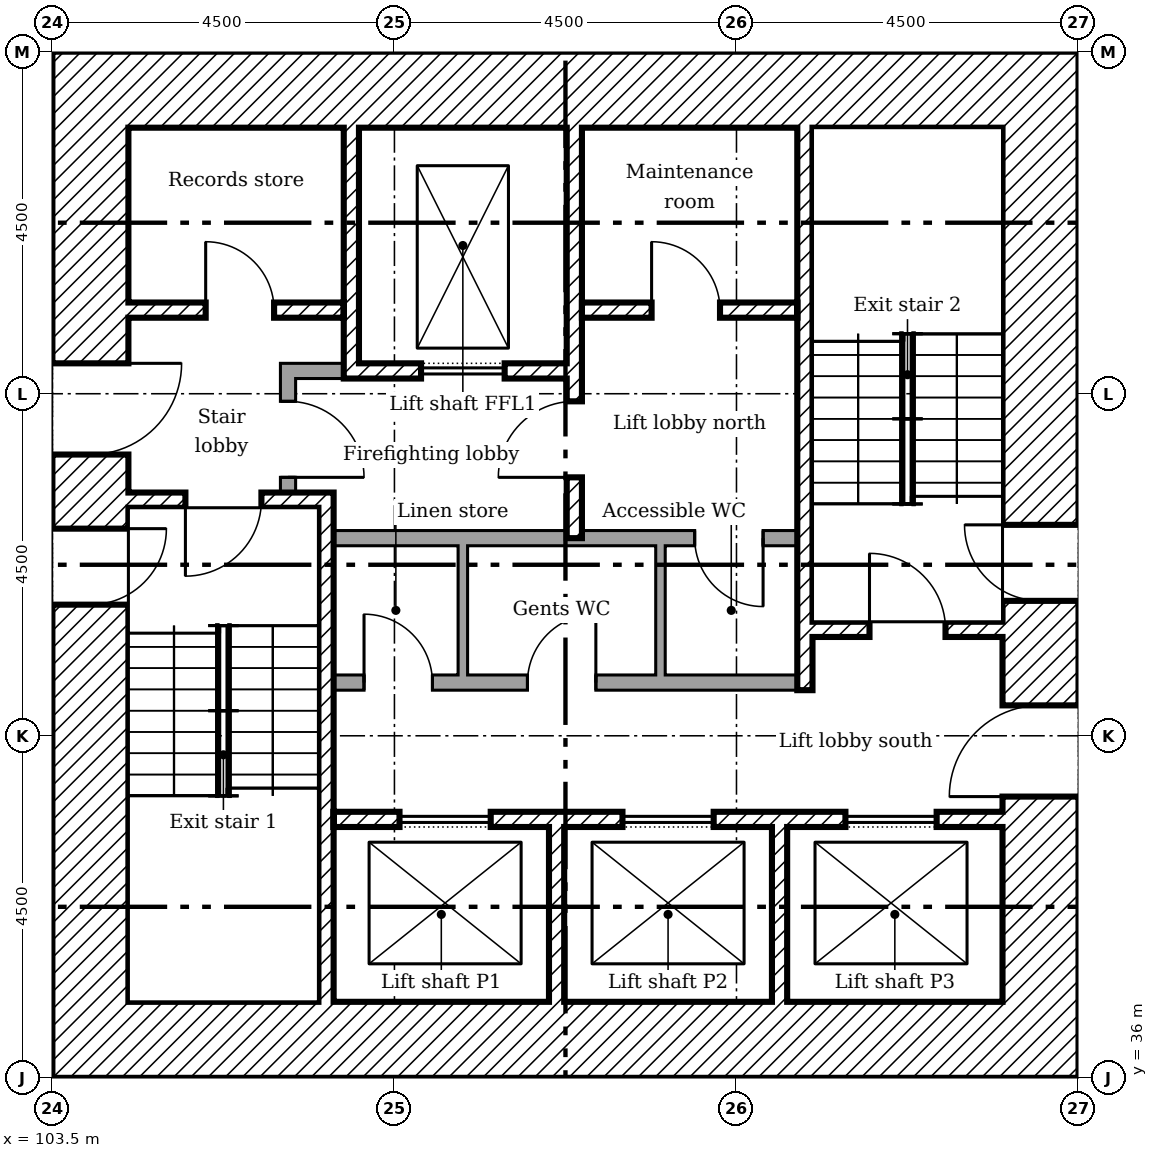
"""IFC4 building model, lengths in metres.
Left out: names, types, materials, properties, quantities, classifications, styles, units other than length and angle.
Written with IfcOpenShell. Run it as: python <this file> out.ifc"""

import sys

from ifc_helpers import new_model, si_unit, direction, frame, frame_2d, origin, place, context, subcontext, project, spatial, rectangle, extrude, element, fill, save


model = new_model("IFC4")
c1 = context("Model", 3, precision=1e-05, world=origin(), true_north=direction((0.0, 1.0)))
c2 = subcontext(c1, "Body", "Model", "MODEL_VIEW")
j1 = project(units=[si_unit("LENGTHUNIT", "METRE"), si_unit("PLANEANGLEUNIT", "RADIAN")], contexts=[c1])
p1 = place(None, origin())
s1 = spatial("IfcSite", under=j1, at=p1, CompositionType="ELEMENT")
p2 = place(p1, origin())
s2 = spatial("IfcBuilding", under=s1, at=p2, CompositionType="ELEMENT")
p3 = place(p2, origin())
s3 = spatial("IfcBuildingStorey", under=s2, at=p3, CompositionType="ELEMENT", Elevation=0.0)
p4 = place(p3, frame((116.5, 36.0, 0.0), z_axis=(0.0, 0.0, 1.0), x_axis=(0.0, 1.0, 0.0)))
e1 = element("IfcWall", 1, at=p4, inside=s3, PredefinedType="SHEAR", context=c2, shape_type="SweptSolid", body=[
    extrude(rectangle(XDim=13.5, YDim=1.0, at=frame_2d((6.75, 0.0))), origin(), (0.0, 0.0, 1.0), 5.5),
])
p5 = place(p4, frame((3.7, 0.0, 0.0)))
e2 = element("IfcOpeningElement", 2, at=p5, cuts=e1, PredefinedType="OPENING", context=c2, shape_type="SweptSolid", body=[
    extrude(rectangle(XDim=1.2, YDim=2.1, at=frame_2d((0.6, 1.05))), frame((0.0, 0.51, 0.0), z_axis=(0.0, -1.0, 0.0), x_axis=(1.0, 0.0, 0.0)), (0.0, 0.0, 1.0), 1.02),
])
p6 = place(p4, frame((6.275, 0.0, 0.0)))
e3 = element("IfcOpeningElement", 3, at=p6, cuts=e1, PredefinedType="OPENING", context=c2, shape_type="SweptSolid", body=[
    extrude(rectangle(XDim=1.0, YDim=2.1, at=frame_2d((0.5, 1.05))), frame((0.0, 0.51, 0.0), z_axis=(0.0, -1.0, 0.0), x_axis=(1.0, 0.0, 0.0)), (0.0, 0.0, 1.0), 1.02),
])
for number, where in (
    (4, (104.5, 49.0, 0.0)),
    (5, (104.5, 36.5, 0.0)),
):
    element("IfcWall", number, at=place(p3, frame(where)), inside=s3, PredefinedType="SHEAR", context=c2, shape_type="SweptSolid", body=[
        extrude(rectangle(XDim=11.5, YDim=1.0, at=frame_2d((5.75, 0.0))), origin(), (0.0, 0.0, 1.0), 5.5),
    ])
p7 = place(p3, frame((104.0, 36.0, 0.0), z_axis=(0.0, 0.0, 1.0), x_axis=(0.0, 1.0, 0.0)))
e6 = element("IfcWall", 6, at=p7, inside=s3, PredefinedType="SHEAR", context=c2, shape_type="SweptSolid", body=[
    extrude(rectangle(XDim=13.5, YDim=1.0, at=frame_2d((6.75, 0.0))), origin(), (0.0, 0.0, 1.0), 5.5),
])
p8 = place(p7, frame((8.2, 0.0, 0.0)))
e7 = element("IfcOpeningElement", 7, at=p8, cuts=e6, PredefinedType="OPENING", context=c2, shape_type="SweptSolid", body=[
    extrude(rectangle(XDim=1.2, YDim=2.1, at=frame_2d((0.6, 1.05))), frame((0.0, 0.51, 0.0), z_axis=(0.0, -1.0, 0.0), x_axis=(1.0, 0.0, 0.0)), (0.0, 0.0, 1.0), 1.02),
])
p9 = place(p7, frame((6.225, 0.0, 0.0)))
e8 = element("IfcOpeningElement", 8, at=p9, cuts=e6, PredefinedType="OPENING", context=c2, shape_type="SweptSolid", body=[
    extrude(rectangle(XDim=1.0, YDim=2.1, at=frame_2d((0.5, 1.05))), frame((0.0, 0.51, 0.0), z_axis=(0.0, -1.0, 0.0), x_axis=(1.0, 0.0, 0.0)), (0.0, 0.0, 1.0), 1.02),
])
p10 = place(p3, frame((107.433, 48.5, 0.0), z_axis=(0.0, 0.0, 1.0), x_axis=(0.0, -1.0, 0.0)))
e9 = element("IfcWall", 9, at=p10, inside=s3, PredefinedType="SHEAR", context=c2, shape_type="SweptSolid", body=[
    extrude(rectangle(XDim=3.3, YDim=0.2, at=frame_2d((1.65, 0.0))), origin(), (0.0, 0.0, 1.0), 5.5),
])
p11 = place(p3, frame((110.367, 48.5, 0.0), z_axis=(0.0, 0.0, 1.0), x_axis=(0.0, -1.0, 0.0)))
e10 = element("IfcWall", 10, at=p11, inside=s3, PredefinedType="SHEAR", context=c2, shape_type="SweptSolid", body=[
    extrude(rectangle(XDim=5.4, YDim=0.2, at=frame_2d((2.7, 0.0))), origin(), (0.0, 0.0, 1.0), 5.5),
])
p12 = place(p11, frame((3.6, 0.0, 0.0)))
e11 = element("IfcOpeningElement", 11, at=p12, cuts=e10, PredefinedType="OPENING", context=c2, shape_type="SweptSolid", body=[
    extrude(rectangle(XDim=1.0, YDim=2.1, at=frame_2d((0.5, 1.05))), frame((0.0, 0.11, 0.0), z_axis=(0.0, -1.0, 0.0), x_axis=(1.0, 0.0, 0.0)), (0.0, 0.0, 1.0), 0.22),
])
for number, where, z_axis, x_axis in (
    (12, (110.133, 37.0, 0.0), (0.0, 0.0, 1.0), (0.0, 1.0, 0.0)),
    (13, (113.067, 37.0, 0.0), (0.0, 0.0, 1.0), (0.0, 1.0, 0.0)),
):
    element("IfcWall", number, at=place(p3, frame(where, z_axis=z_axis, x_axis=x_axis)), inside=s3, PredefinedType="SHEAR", context=c2, shape_type="SweptSolid", body=[
        extrude(rectangle(XDim=2.3, YDim=0.2, at=frame_2d((1.15, 0.0))), origin(), (0.0, 0.0, 1.0), 5.5),
    ])
p13 = place(p3, frame((106.5, 45.3, 0.0)))
e14 = element("IfcWall", 14, at=p13, inside=s3, PredefinedType="PARTITIONING", context=c2, shape_type="SweptSolid", body=[
    extrude(rectangle(XDim=0.833, YDim=0.2, at=frame_2d((0.417, 0.0))), origin(), (0.0, 0.0, 1.0), 5.5),
])
p14 = place(p3, frame((106.6, 43.7, 0.0), z_axis=(0.0, 0.0, 1.0), x_axis=(0.0, 1.0, 0.0)))
e15 = element("IfcWall", 15, at=p14, inside=s3, PredefinedType="PARTITIONING", context=c2, shape_type="SweptSolid", body=[
    extrude(rectangle(XDim=1.5, YDim=0.2, at=frame_2d((0.75, 0.0))), origin(), (0.0, 0.0, 1.0), 5.5),
])
p15 = place(p14, frame((0.2, 0.0, 0.0)))
e16 = element("IfcOpeningElement", 16, at=p15, cuts=e15, PredefinedType="OPENING", context=c2, shape_type="SweptSolid", body=[
    extrude(rectangle(XDim=1.0, YDim=2.1, at=frame_2d((0.5, 1.05))), frame((0.0, 0.11, 0.0), z_axis=(0.0, -1.0, 0.0), x_axis=(1.0, 0.0, 0.0)), (0.0, 0.0, 1.0), 0.22),
])
p16 = place(p3, frame((104.5, 46.1, 0.0)))
e17 = element("IfcWall", 17, at=p16, inside=s3, PredefinedType="SHEAR", context=c2, shape_type="SweptSolid", body=[
    extrude(rectangle(XDim=2.833, YDim=0.2, at=frame_2d((1.417, 0.0))), origin(), (0.0, 0.0, 1.0), 5.5),
])
p17 = place(p16, frame((1.017, 0.0, 0.0)))
e18 = element("IfcOpeningElement", 18, at=p17, cuts=e17, PredefinedType="OPENING", context=c2, shape_type="SweptSolid", body=[
    extrude(rectangle(XDim=0.9, YDim=2.1, at=frame_2d((0.45, 1.05))), frame((0.0, 0.11, 0.0), z_axis=(0.0, -1.0, 0.0), x_axis=(1.0, 0.0, 0.0)), (0.0, 0.0, 1.0), 0.22),
])
p18 = place(p3, frame((110.467, 46.1, 0.0)))
e19 = element("IfcWall", 19, at=p18, inside=s3, PredefinedType="SHEAR", context=c2, shape_type="SweptSolid", body=[
    extrude(rectangle(XDim=2.833, YDim=0.2, at=frame_2d((1.417, 0.0))), origin(), (0.0, 0.0, 1.0), 5.5),
])
p19 = place(p18, frame((0.917, 0.0, 0.0)))
e20 = element("IfcOpeningElement", 20, at=p19, cuts=e19, PredefinedType="OPENING", context=c2, shape_type="SweptSolid", body=[
    extrude(rectangle(XDim=0.9, YDim=2.1, at=frame_2d((0.45, 1.05))), frame((0.0, 0.11, 0.0), z_axis=(0.0, -1.0, 0.0), x_axis=(1.0, 0.0, 0.0)), (0.0, 0.0, 1.0), 0.22),
])
p20 = place(p3, frame((107.533, 45.3, 0.0)))
e21 = element("IfcWall", 21, at=p20, inside=s3, PredefinedType="SHEAR", context=c2, shape_type="SweptSolid", body=[
    extrude(rectangle(XDim=2.733, YDim=0.2, at=frame_2d((1.367, 0.0))), origin(), (0.0, 0.0, 1.0), 5.5),
])
p21 = place(p20, frame((0.817, 0.0, 0.0)))
e22 = element("IfcOpeningElement", 22, at=p21, cuts=e21, PredefinedType="OPENING", context=c2, shape_type="SweptSolid", body=[
    extrude(rectangle(XDim=1.1, YDim=2.1, at=frame_2d((0.55, 1.05))), frame((0.0, 0.11, 0.0), z_axis=(0.0, -1.0, 0.0), x_axis=(1.0, 0.0, 0.0)), (0.0, 0.0, 1.0), 0.22),
])
p22 = place(p3, frame((107.2, 39.4, 0.0)))
e23 = element("IfcWall", 23, at=p22, inside=s3, PredefinedType="SHEAR", context=c2, shape_type="SweptSolid", body=[
    extrude(rectangle(XDim=8.8, YDim=0.2, at=frame_2d((4.4, 0.0))), origin(), (0.0, 0.0, 1.0), 5.5),
])
p23 = place(p22, frame((0.867, 0.0, 0.0)))
e24 = element("IfcOpeningElement", 24, at=p23, cuts=e23, PredefinedType="OPENING", context=c2, shape_type="SweptSolid", body=[
    extrude(rectangle(XDim=1.2, YDim=2.1, at=frame_2d((0.6, 1.05))), frame((0.0, 0.11, 0.0), z_axis=(0.0, -1.0, 0.0), x_axis=(1.0, 0.0, 0.0)), (0.0, 0.0, 1.0), 0.22),
])
p24 = place(p22, frame((3.8, 0.0, 0.0)))
e25 = element("IfcOpeningElement", 25, at=p24, cuts=e23, PredefinedType="OPENING", context=c2, shape_type="SweptSolid", body=[
    extrude(rectangle(XDim=1.2, YDim=2.1, at=frame_2d((0.6, 1.05))), frame((0.0, 0.11, 0.0), z_axis=(0.0, -1.0, 0.0), x_axis=(1.0, 0.0, 0.0)), (0.0, 0.0, 1.0), 0.22),
])
p25 = place(p22, frame((6.733, 0.0, 0.0)))
e26 = element("IfcOpeningElement", 26, at=p25, cuts=e23, PredefinedType="OPENING", context=c2, shape_type="SweptSolid", body=[
    extrude(rectangle(XDim=1.2, YDim=2.1, at=frame_2d((0.6, 1.05))), frame((0.0, 0.11, 0.0), z_axis=(0.0, -1.0, 0.0), x_axis=(1.0, 0.0, 0.0)), (0.0, 0.0, 1.0), 0.22),
])
p26 = place(p3, frame((107.1, 37.0, 0.0), z_axis=(0.0, 0.0, 1.0), x_axis=(0.0, 1.0, 0.0)))
e27 = element("IfcWall", 27, at=p26, inside=s3, PredefinedType="SHEAR", context=c2, shape_type="SweptSolid", body=[
    extrude(rectangle(XDim=6.7, YDim=0.2, at=frame_2d((3.35, 0.0))), origin(), (0.0, 0.0, 1.0), 5.5),
])
p27 = place(p3, frame((104.5, 43.6, 0.0)))
e28 = element("IfcWall", 28, at=p27, inside=s3, PredefinedType="SHEAR", context=c2, shape_type="SweptSolid", body=[
    extrude(rectangle(XDim=2.5, YDim=0.2, at=frame_2d((1.25, 0.0))), origin(), (0.0, 0.0, 1.0), 5.5),
])
p28 = place(p27, frame((0.75, 0.0, 0.0)))
e29 = element("IfcOpeningElement", 29, at=p28, cuts=e28, PredefinedType="OPENING", context=c2, shape_type="SweptSolid", body=[
    extrude(rectangle(XDim=1.0, YDim=2.1, at=frame_2d((0.5, 1.05))), frame((0.0, 0.11, 0.0), z_axis=(0.0, -1.0, 0.0), x_axis=(1.0, 0.0, 0.0)), (0.0, 0.0, 1.0), 0.22),
])
p29 = place(p3, frame((113.5, 41.9, 0.0)))
e30 = element("IfcWall", 30, at=p29, inside=s3, PredefinedType="SHEAR", context=c2, shape_type="SweptSolid", body=[
    extrude(rectangle(XDim=2.5, YDim=0.2, at=frame_2d((1.25, 0.0))), origin(), (0.0, 0.0, 1.0), 5.5),
])
p30 = place(p29, frame((0.75, 0.0, 0.0)))
e31 = element("IfcOpeningElement", 31, at=p30, cuts=e30, PredefinedType="OPENING", context=c2, shape_type="SweptSolid", body=[
    extrude(rectangle(XDim=1.0, YDim=2.1, at=frame_2d((0.5, 1.05))), frame((0.0, 0.11, 0.0), z_axis=(0.0, -1.0, 0.0), x_axis=(1.0, 0.0, 0.0)), (0.0, 0.0, 1.0), 0.22),
])
p31 = place(p3, frame((113.4, 41.1, 0.0), z_axis=(0.0, 0.0, 1.0), x_axis=(0.0, 1.0, 0.0)))
e32 = element("IfcWall", 32, at=p31, inside=s3, PredefinedType="SHEAR", context=c2, shape_type="SweptSolid", body=[
    extrude(rectangle(XDim=7.4, YDim=0.2, at=frame_2d((3.7, 0.0))), origin(), (0.0, 0.0, 1.0), 5.5),
])
p32 = place(p3, frame((107.2, 43.1, 0.0)))
e33 = element("IfcWall", 33, at=p32, inside=s3, PredefinedType="PARTITIONING", context=c2, shape_type="SweptSolid", body=[
    extrude(rectangle(XDim=6.1, YDim=0.2, at=frame_2d((3.05, 0.0))), origin(), (0.0, 0.0, 1.0), 5.5),
])
p33 = place(p32, frame((4.75, 0.0, 0.0)))
e34 = element("IfcOpeningElement", 34, at=p33, cuts=e33, PredefinedType="OPENING", context=c2, shape_type="SweptSolid", body=[
    extrude(rectangle(XDim=0.9, YDim=2.1, at=frame_2d((0.45, 1.05))), frame((0.0, 0.11, 0.0), z_axis=(0.0, -1.0, 0.0), x_axis=(1.0, 0.0, 0.0)), (0.0, 0.0, 1.0), 0.22),
])
p34 = place(p3, frame((107.2, 41.2, 0.0)))
e35 = element("IfcWall", 35, at=p34, inside=s3, PredefinedType="PARTITIONING", context=c2, shape_type="SweptSolid", body=[
    extrude(rectangle(XDim=6.1, YDim=0.2, at=frame_2d((3.05, 0.0))), origin(), (0.0, 0.0, 1.0), 5.5),
])
p35 = place(p34, frame((0.4, 0.0, 0.0)))
e36 = element("IfcOpeningElement", 36, at=p35, cuts=e35, PredefinedType="OPENING", context=c2, shape_type="SweptSolid", body=[
    extrude(rectangle(XDim=0.9, YDim=2.1, at=frame_2d((0.45, 1.05))), frame((0.0, 0.11, 0.0), z_axis=(0.0, -1.0, 0.0), x_axis=(1.0, 0.0, 0.0)), (0.0, 0.0, 1.0), 0.22),
])
p36 = place(p34, frame((2.55, 0.0, 0.0)))
e37 = element("IfcOpeningElement", 37, at=p36, cuts=e35, PredefinedType="OPENING", context=c2, shape_type="SweptSolid", body=[
    extrude(rectangle(XDim=0.9, YDim=2.1, at=frame_2d((0.45, 1.05))), frame((0.0, 0.11, 0.0), z_axis=(0.0, -1.0, 0.0), x_axis=(1.0, 0.0, 0.0)), (0.0, 0.0, 1.0), 0.22),
])
for number, where, z_axis, x_axis in (
    (38, (108.9, 41.3, 0.0), (0.0, 0.0, 1.0), (0.0, 1.0, 0.0)),
    (39, (111.5, 41.3, 0.0), (0.0, 0.0, 1.0), (0.0, 1.0, 0.0)),
):
    element("IfcWall", number, at=place(p3, frame(where, z_axis=z_axis, x_axis=x_axis)), inside=s3, PredefinedType="PARTITIONING", context=c2, shape_type="SweptSolid", body=[
        extrude(rectangle(XDim=1.7, YDim=0.125, at=frame_2d((0.85, 0.0))), origin(), (0.0, 0.0, 1.0), 5.5),
    ])
p37 = place(p8, frame((1.2, 0.0, 0.0), x_axis=(-1.0, 0.0, 0.0)))
e40 = element("IfcDoor", 40, at=p37, inside=s3, OperationType="SINGLE_SWING_RIGHT", PredefinedType="DOOR", context=c2, shape_type="SweptSolid", body=[
    extrude(rectangle(XDim=1.2, YDim=2.1, at=frame_2d((0.6, 1.05))), frame((0.0, 0.025, 0.0), z_axis=(0.0, -1.0, 0.0), x_axis=(1.0, 0.0, 0.0)), (0.0, 0.0, 1.0), 0.05),
])
fill(e7, e40)
p38 = place(p5, origin())
e41 = element("IfcDoor", 41, at=p38, inside=s3, OperationType="SINGLE_SWING_RIGHT", PredefinedType="DOOR", context=c2, shape_type="SweptSolid", body=[
    extrude(rectangle(XDim=1.2, YDim=2.1, at=frame_2d((0.6, 1.05))), frame((0.0, 0.025, 0.0), z_axis=(0.0, -1.0, 0.0), x_axis=(1.0, 0.0, 0.0)), (0.0, 0.0, 1.0), 0.05),
])
fill(e2, e41)
p39 = place(p28, frame((1.0, 0.0, 0.0), x_axis=(-1.0, 0.0, 0.0)))
e42 = element("IfcDoor", 42, at=p39, inside=s3, OperationType="SINGLE_SWING_LEFT", PredefinedType="DOOR", context=c2, shape_type="SweptSolid", body=[
    extrude(rectangle(XDim=1.0, YDim=2.1, at=frame_2d((0.5, 1.05))), frame((0.0, 0.025, 0.0), z_axis=(0.0, -1.0, 0.0), x_axis=(1.0, 0.0, 0.0)), (0.0, 0.0, 1.0), 0.05),
])
fill(e29, e42)
p40 = place(p9, frame((1.0, 0.0, 0.0), x_axis=(-1.0, 0.0, 0.0)))
e43 = element("IfcDoor", 43, at=p40, inside=s3, OperationType="SINGLE_SWING_RIGHT", PredefinedType="DOOR", context=c2, shape_type="SweptSolid", body=[
    extrude(rectangle(XDim=1.0, YDim=2.1, at=frame_2d((0.5, 1.05))), frame((0.0, 0.025, 0.0), z_axis=(0.0, -1.0, 0.0), x_axis=(1.0, 0.0, 0.0)), (0.0, 0.0, 1.0), 0.05),
])
fill(e8, e43)
p41 = place(p30, origin())
e44 = element("IfcDoor", 44, at=p41, inside=s3, OperationType="SINGLE_SWING_RIGHT", PredefinedType="DOOR", context=c2, shape_type="SweptSolid", body=[
    extrude(rectangle(XDim=1.0, YDim=2.1, at=frame_2d((0.5, 1.05))), frame((0.0, 0.025, 0.0), z_axis=(0.0, -1.0, 0.0), x_axis=(1.0, 0.0, 0.0)), (0.0, 0.0, 1.0), 0.05),
])
fill(e31, e44)
p42 = place(p6, origin())
e45 = element("IfcDoor", 45, at=p42, inside=s3, OperationType="SINGLE_SWING_LEFT", PredefinedType="DOOR", context=c2, shape_type="SweptSolid", body=[
    extrude(rectangle(XDim=1.0, YDim=2.1, at=frame_2d((0.5, 1.05))), frame((0.0, 0.025, 0.0), z_axis=(0.0, -1.0, 0.0), x_axis=(1.0, 0.0, 0.0)), (0.0, 0.0, 1.0), 0.05),
])
fill(e3, e45)
p43 = place(p12, frame((1.0, 0.0, 0.0), x_axis=(-1.0, 0.0, 0.0)))
e46 = element("IfcDoor", 46, at=p43, inside=s3, OperationType="SINGLE_SWING_RIGHT", PredefinedType="DOOR", context=c2, shape_type="SweptSolid", body=[
    extrude(rectangle(XDim=1.0, YDim=2.1, at=frame_2d((0.5, 1.05))), frame((0.0, 0.025, 0.0), z_axis=(0.0, -1.0, 0.0), x_axis=(1.0, 0.0, 0.0)), (0.0, 0.0, 1.0), 0.05),
])
fill(e11, e46)
p44 = place(p15, frame((1.0, 0.0, 0.0), x_axis=(-1.0, 0.0, 0.0)))
e47 = element("IfcDoor", 47, at=p44, inside=s3, OperationType="SINGLE_SWING_LEFT", PredefinedType="DOOR", context=c2, shape_type="SweptSolid", body=[
    extrude(rectangle(XDim=1.0, YDim=2.1, at=frame_2d((0.5, 1.05))), frame((0.0, 0.025, 0.0), z_axis=(0.0, -1.0, 0.0), x_axis=(1.0, 0.0, 0.0)), (0.0, 0.0, 1.0), 0.05),
])
fill(e16, e47)
p45 = place(p17, origin())
e48 = element("IfcDoor", 48, at=p45, inside=s3, OperationType="SINGLE_SWING_RIGHT", PredefinedType="DOOR", context=c2, shape_type="SweptSolid", body=[
    extrude(rectangle(XDim=0.9, YDim=2.1, at=frame_2d((0.45, 1.05))), frame((0.0, 0.025, 0.0), z_axis=(0.0, -1.0, 0.0), x_axis=(1.0, 0.0, 0.0)), (0.0, 0.0, 1.0), 0.05),
])
fill(e18, e48)
p46 = place(p19, origin())
e49 = element("IfcDoor", 49, at=p46, inside=s3, OperationType="SINGLE_SWING_RIGHT", PredefinedType="DOOR", context=c2, shape_type="SweptSolid", body=[
    extrude(rectangle(XDim=0.9, YDim=2.1, at=frame_2d((0.45, 1.05))), frame((0.0, 0.025, 0.0), z_axis=(0.0, -1.0, 0.0), x_axis=(1.0, 0.0, 0.0)), (0.0, 0.0, 1.0), 0.05),
])
fill(e20, e49)
p47 = place(p35, origin())
e50 = element("IfcDoor", 50, at=p47, inside=s3, OperationType="SINGLE_SWING_RIGHT", PredefinedType="DOOR", context=c2, shape_type="SweptSolid", body=[
    extrude(rectangle(XDim=0.9, YDim=2.1, at=frame_2d((0.45, 1.05))), frame((0.0, 0.025, 0.0), z_axis=(0.0, -1.0, 0.0), x_axis=(1.0, 0.0, 0.0)), (0.0, 0.0, 1.0), 0.05),
])
fill(e36, e50)
p48 = place(p36, origin())
e51 = element("IfcDoor", 51, at=p48, inside=s3, OperationType="SINGLE_SWING_LEFT", PredefinedType="DOOR", context=c2, shape_type="SweptSolid", body=[
    extrude(rectangle(XDim=0.9, YDim=2.1, at=frame_2d((0.45, 1.05))), frame((0.0, 0.025, 0.0), z_axis=(0.0, -1.0, 0.0), x_axis=(1.0, 0.0, 0.0)), (0.0, 0.0, 1.0), 0.05),
])
fill(e37, e51)
p49 = place(p33, frame((0.9, 0.0, 0.0), x_axis=(-1.0, 0.0, 0.0)))
e52 = element("IfcDoor", 52, at=p49, inside=s3, OperationType="SINGLE_SWING_RIGHT", PredefinedType="DOOR", context=c2, shape_type="SweptSolid", body=[
    extrude(rectangle(XDim=0.9, YDim=2.1, at=frame_2d((0.45, 1.05))), frame((0.0, 0.025, 0.0), z_axis=(0.0, -1.0, 0.0), x_axis=(1.0, 0.0, 0.0)), (0.0, 0.0, 1.0), 0.05),
])
fill(e34, e52)
p50 = place(p21, origin())
e53 = element("IfcDoor", 53, at=p50, inside=s3, OperationType="SLIDING_TO_LEFT", PredefinedType="DOOR", context=c2, shape_type="SweptSolid", body=[
    extrude(rectangle(XDim=1.1, YDim=2.1, at=frame_2d((0.55, 1.05))), frame((0.0, 0.025, 0.0), z_axis=(0.0, -1.0, 0.0), x_axis=(1.0, 0.0, 0.0)), (0.0, 0.0, 1.0), 0.05),
])
fill(e22, e53)
p51 = place(p23, origin())
e54 = element("IfcDoor", 54, at=p51, inside=s3, OperationType="SLIDING_TO_LEFT", PredefinedType="DOOR", context=c2, shape_type="SweptSolid", body=[
    extrude(rectangle(XDim=1.2, YDim=2.1, at=frame_2d((0.6, 1.05))), frame((0.0, 0.025, 0.0), z_axis=(0.0, -1.0, 0.0), x_axis=(1.0, 0.0, 0.0)), (0.0, 0.0, 1.0), 0.05),
])
fill(e24, e54)
p52 = place(p24, origin())
e55 = element("IfcDoor", 55, at=p52, inside=s3, OperationType="SLIDING_TO_LEFT", PredefinedType="DOOR", context=c2, shape_type="SweptSolid", body=[
    extrude(rectangle(XDim=1.2, YDim=2.1, at=frame_2d((0.6, 1.05))), frame((0.0, 0.025, 0.0), z_axis=(0.0, -1.0, 0.0), x_axis=(1.0, 0.0, 0.0)), (0.0, 0.0, 1.0), 0.05),
])
fill(e25, e55)
p53 = place(p25, origin())
e56 = element("IfcDoor", 56, at=p53, inside=s3, OperationType="SLIDING_TO_LEFT", PredefinedType="DOOR", context=c2, shape_type="SweptSolid", body=[
    extrude(rectangle(XDim=1.2, YDim=2.1, at=frame_2d((0.6, 1.05))), frame((0.0, 0.025, 0.0), z_axis=(0.0, -1.0, 0.0), x_axis=(1.0, 0.0, 0.0)), (0.0, 0.0, 1.0), 0.05),
])
fill(e26, e56)
save(model, sys.argv[1])
